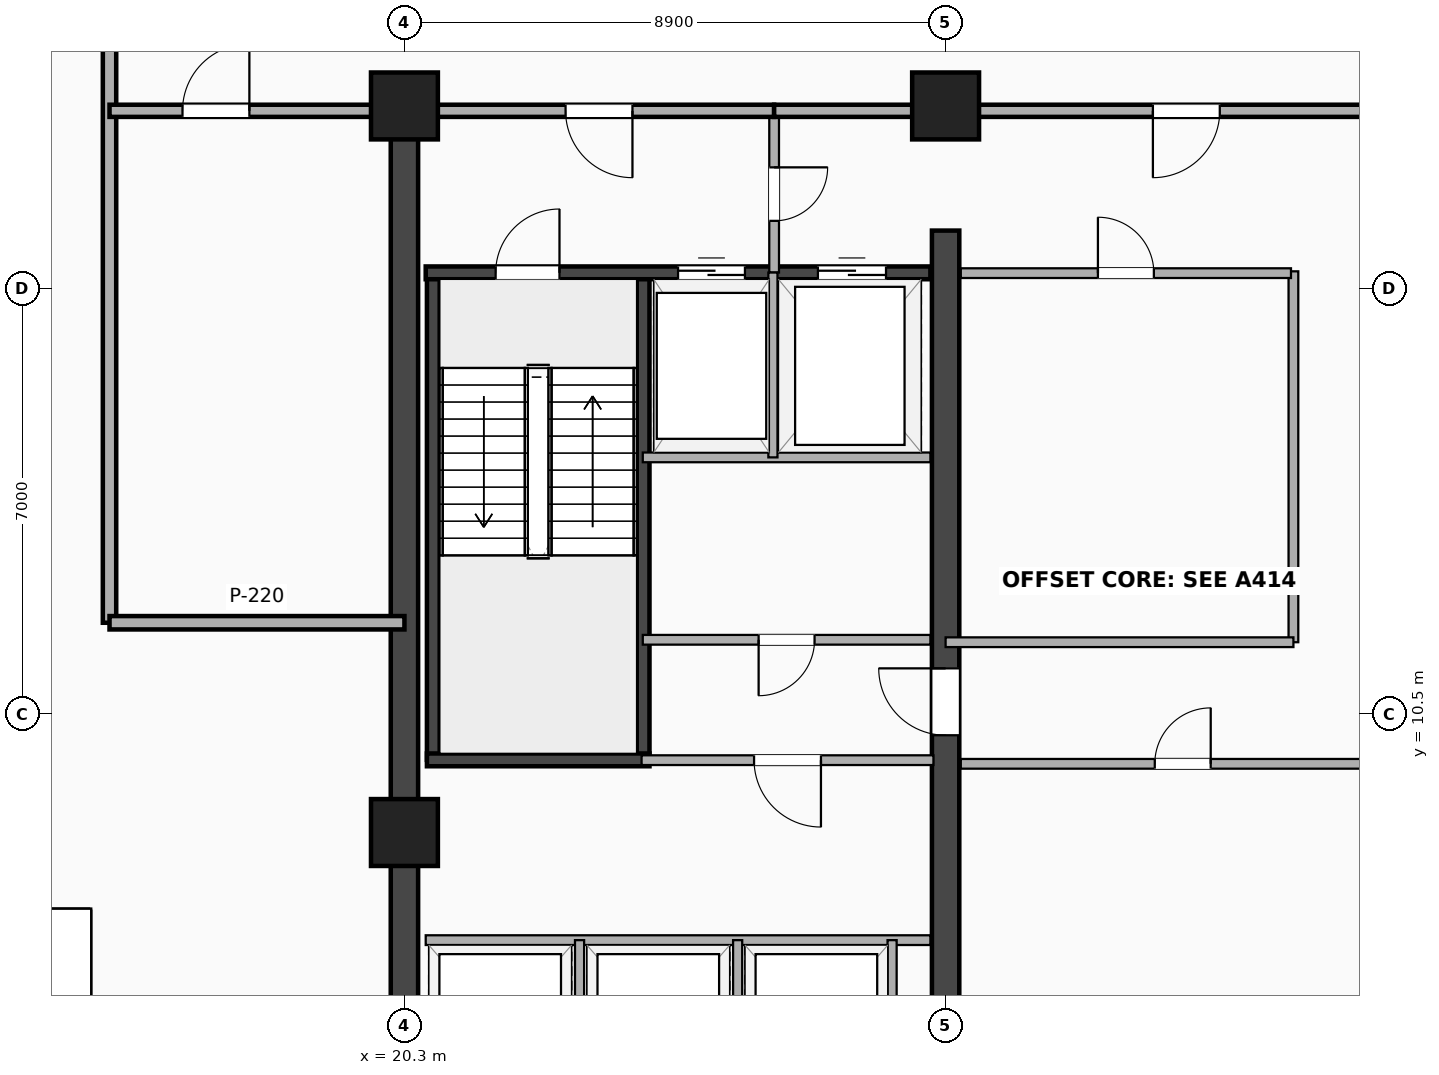
"""IFC4 building model, lengths in metres.
Left out: names, types, materials, properties, quantities, classifications, styles, units other than length and angle.
Written with IfcOpenShell. Run it as: python <this file> out.ifc"""

import sys

from ifc_helpers import new_model, si_unit, direction, frame, frame_2d, origin, origin_2d, place, context, subcontext, project, spatial, rectangle, extrude, element, fill, save


model = new_model("IFC4")
c1 = context("Model", 3, precision=1e-05, world=origin(), true_north=direction((0.0, 1.0)))
c2 = subcontext(c1, "Body", "Model", "MODEL_VIEW")
j1 = project(units=[si_unit("LENGTHUNIT", "METRE"), si_unit("PLANEANGLEUNIT", "RADIAN")], contexts=[c1])
p1 = place(None, origin())
s1 = spatial("IfcSite", under=j1, at=p1, CompositionType="ELEMENT")
p2 = place(p1, origin())
s2 = spatial("IfcBuilding", under=s1, at=p2, CompositionType="ELEMENT")
p3 = place(p2, frame((0.0, 0.0, 184.1)))
s3 = spatial("IfcBuildingStorey", under=s2, at=p3, CompositionType="ELEMENT", Elevation=184.1)
p4 = place(p3, frame((20.3, 3.5, 0.0), z_axis=(0.0, 0.0, 1.0), x_axis=(0.0, 1.0, 0.0)))
e1 = element("IfcWall", 1, at=p4, inside=s3, PredefinedType="SHEAR", context=c2, shape_type="SweptSolid", body=[
    extrude(rectangle(XDim=16.9, YDim=0.45, at=frame_2d((8.45, 0.0))), origin(), (0.0, 0.0, 1.0), 8.16),
])
p5 = place(p3, frame((29.2, 3.5, 0.0), z_axis=(0.0, 0.0, 1.0), x_axis=(0.0, 1.0, 0.0)))
e2 = element("IfcWall", 2, at=p5, inside=s3, PredefinedType="SHEAR", context=c2, shape_type="SweptSolid", body=[
    extrude(rectangle(XDim=14.95, YDim=0.45, at=frame_2d((7.475, 0.0))), origin(), (0.0, 0.0, 1.0), 8.16),
])
p6 = place(p5, frame((7.75, 0.0, 0.0), z_axis=(0.0, 0.0, 1.0), x_axis=(-1.0, 0.0, 0.0)))
e3 = element("IfcOpeningElement", 3, at=p6, cuts=e2, PredefinedType="OPENING", context=c2, shape_type="SweptSolid", body=[
    extrude(rectangle(XDim=1.1, YDim=2.15, at=frame_2d((0.55, 1.075))), frame((0.0, 0.235, 0.0), z_axis=(0.0, -1.0, 0.0), x_axis=(1.0, 0.0, 0.0)), (0.0, 0.0, 1.0), 0.47),
])
for number, where, z_axis, x_axis in (
    (4, (20.775, 9.745, 0.0), (0.0, 0.0, 1.0), (0.0, 1.0, 0.0)),
    (5, (24.225, 9.745, 0.0), (0.0, 0.0, 1.0), (0.0, 1.0, 0.0)),
):
    element("IfcWall", number, at=place(p3, frame(where, z_axis=z_axis, x_axis=x_axis)), inside=s3, PredefinedType="SHEAR", context=c2, shape_type="SweptSolid", body=[
        extrude(rectangle(XDim=8.01, YDim=0.21, at=frame_2d((4.005, 0.0))), origin(), (0.0, 0.0, 1.0), 8.16),
    ])
p7 = place(p3, frame((20.67, 9.745, 0.0), z_axis=(0.0, 0.0, 1.0), x_axis=(1.0, 0.0, 0.0)))
e6 = element("IfcWall", 6, at=p7, inside=s3, PredefinedType="SHEAR", context=c2, shape_type="SweptSolid", body=[
    extrude(rectangle(XDim=3.66, YDim=0.21, at=frame_2d((1.83, 0.0))), origin(), (0.0, 0.0, 1.0), 8.16),
])
p8 = place(p3, frame((20.65, 17.755, 0.0), z_axis=(0.0, 0.0, 1.0), x_axis=(1.0, 0.0, 0.0)))
e7 = element("IfcWall", 7, at=p8, inside=s3, PredefinedType="SHEAR", context=c2, shape_type="SweptSolid", body=[
    extrude(rectangle(XDim=8.3, YDim=0.21, at=frame_2d((4.15, 0.0))), origin(), (0.0, 0.0, 1.0), 8.16),
])
p9 = place(p8, frame((2.2, 0.0, 0.0), z_axis=(0.0, 0.0, 1.0), x_axis=(-1.0, 0.0, 0.0)))
e8 = element("IfcOpeningElement", 8, at=p9, cuts=e7, PredefinedType="OPENING", context=c2, shape_type="SweptSolid", body=[
    extrude(rectangle(XDim=1.05, YDim=2.15, at=frame_2d((0.525, 1.075))), frame((0.0, 0.115, 0.0), z_axis=(0.0, -1.0, 0.0), x_axis=(1.0, 0.0, 0.0)), (0.0, 0.0, 1.0), 0.23),
])
p10 = place(p8, frame((4.15, 0.0, 0.0)))
e9 = element("IfcOpeningElement", 9, at=p10, cuts=e7, PredefinedType="OPENING", context=c2, shape_type="SweptSolid", body=[
    extrude(rectangle(XDim=1.1, YDim=2.18, at=frame_2d((0.55, 1.09))), frame((0.0, 0.115, 0.0), z_axis=(0.0, -1.0, 0.0), x_axis=(1.0, 0.0, 0.0)), (0.0, 0.0, 1.0), 0.23),
])
p11 = place(p8, frame((6.45, 0.0, 0.0)))
e10 = element("IfcOpeningElement", 10, at=p11, cuts=e7, PredefinedType="OPENING", context=c2, shape_type="SweptSolid", body=[
    extrude(rectangle(XDim=1.12, YDim=2.2, at=frame_2d((0.56, 1.1))), frame((0.0, 0.115, 0.0), z_axis=(0.0, -1.0, 0.0), x_axis=(1.0, 0.0, 0.0)), (0.0, 0.0, 1.0), 0.23),
])
for number, where, z_axis, x_axis in (
    (11, (20.3, 8.55, -0.32), (0.0, 0.0, 1.0), (1.0, 0.0, 0.0)),
    (12, (20.3, 20.5, -0.32), (0.0, 0.0, 1.0), (1.0, 0.0, 0.0)),
    (13, (29.2, 20.5, -0.32), (0.0, 0.0, 1.0), (1.0, 0.0, 0.0)),
):
    element("IfcColumn", number, at=place(p3, frame(where, z_axis=z_axis, x_axis=x_axis)), inside=s3, PredefinedType="COLUMN", context=c2, shape_type="SweptSolid", body=[
        extrude(rectangle(XDim=1.1, YDim=1.1, at=origin_2d()), origin(), (0.0, 0.0, 1.0), 8.48),
    ])
p12 = place(p3, frame((26.38, 17.76, 0.0), z_axis=(0.0, 0.0, 1.0), x_axis=(0.0, 1.0, 0.0)))
e14 = element("IfcWall", 14, at=p12, inside=s3, PredefinedType="PARTITIONING", context=c2, shape_type="SweptSolid", body=[
    extrude(rectangle(XDim=2.66, YDim=0.16, at=frame_2d((1.33, 0.0))), origin(), (0.0, 0.0, 1.0), 7.602),
])
p13 = place(p12, frame((0.85, 0.0, 0.0)))
e15 = element("IfcOpeningElement", 15, at=p13, cuts=e14, PredefinedType="OPENING", context=c2, shape_type="SweptSolid", body=[
    extrude(rectangle(XDim=0.88, YDim=2.08, at=frame_2d((0.44, 1.04))), frame((0.0, 0.09, 0.0), z_axis=(0.0, -1.0, 0.0), x_axis=(1.0, 0.0, 0.0)), (0.0, 0.0, 1.0), 0.18),
])
p14 = place(p3, frame((24.22, 14.72, 0.0), z_axis=(0.0, 0.0, 1.0), x_axis=(1.0, 0.0, 0.0)))
e16 = element("IfcWall", 16, at=p14, inside=s3, PredefinedType="PARTITIONING", context=c2, shape_type="SweptSolid", body=[
    extrude(rectangle(XDim=4.73, YDim=0.16, at=frame_2d((2.365, 0.0))), origin(), (0.0, 0.0, 1.0), 8.16),
])
p15 = place(p3, frame((26.36, 14.72, 0.0), z_axis=(0.0, 0.0, 1.0), x_axis=(0.0, 1.0, 0.0)))
e17 = element("IfcWall", 17, at=p15, inside=s3, PredefinedType="PARTITIONING", context=c2, shape_type="SweptSolid", body=[
    extrude(rectangle(XDim=3.04, YDim=0.15, at=frame_2d((1.52, 0.0))), origin(), (0.0, 0.0, 1.0), 8.16),
])
p16 = place(p3, frame((20.65, 20.42, 0.0), z_axis=(0.0, 0.0, 1.0), x_axis=(1.0, 0.0, 0.0)))
e18 = element("IfcWall", 18, at=p16, inside=s3, PredefinedType="PARTITIONING", context=c2, shape_type="SweptSolid", body=[
    extrude(rectangle(XDim=5.73, YDim=0.2, at=frame_2d((2.865, 0.0))), origin(), (0.0, 0.0, 1.0), 7.29),
])
p17 = place(p16, frame((2.3, 0.0, 0.0)))
e19 = element("IfcOpeningElement", 19, at=p17, cuts=e18, PredefinedType="OPENING", context=c2, shape_type="SweptSolid", body=[
    extrude(rectangle(XDim=1.1, YDim=2.15, at=frame_2d((0.55, 1.075))), frame((0.0, 0.11, 0.0), z_axis=(0.0, -1.0, 0.0), x_axis=(1.0, 0.0, 0.0)), (0.0, 0.0, 1.0), 0.22),
])
p18 = place(p3, frame((26.38, 20.42, 0.0), z_axis=(0.0, 0.0, 1.0), x_axis=(1.0, 0.0, 0.0)))
e20 = element("IfcWall", 20, at=p18, inside=s3, PredefinedType="PARTITIONING", context=c2, shape_type="SweptSolid", body=[
    extrude(rectangle(XDim=2.82, YDim=0.2, at=frame_2d((1.41, 0.0))), origin(), (0.0, 0.0, 1.0), 7.29),
])
p19 = place(p3, frame((29.2, 20.42, 0.0), z_axis=(0.0, 0.0, 1.0), x_axis=(1.0, 0.0, 0.0)))
e21 = element("IfcWall", 21, at=p19, inside=s3, PredefinedType="PARTITIONING", context=c2, shape_type="SweptSolid", body=[
    extrude(rectangle(XDim=7.8, YDim=0.2, at=frame_2d((3.9, 0.0))), origin(), (0.0, 0.0, 1.0), 7.29),
])
p20 = place(p19, frame((3.409, 0.0, 0.0)))
e22 = element("IfcOpeningElement", 22, at=p20, cuts=e21, PredefinedType="OPENING", context=c2, shape_type="SweptSolid", body=[
    extrude(rectangle(XDim=1.1, YDim=2.15, at=frame_2d((0.55, 1.075))), frame((0.0, 0.11, 0.0), z_axis=(0.0, -1.0, 0.0), x_axis=(1.0, 0.0, 0.0)), (0.0, 0.0, 1.0), 0.22),
])
p21 = place(p3, frame((24.22, 11.72, 0.0), z_axis=(0.0, 0.0, 1.0), x_axis=(1.0, 0.0, 0.0)))
e23 = element("IfcWall", 23, at=p21, inside=s3, PredefinedType="PARTITIONING", context=c2, shape_type="SweptSolid", body=[
    extrude(rectangle(XDim=4.73, YDim=0.16, at=frame_2d((2.365, 0.0))), origin(), (0.0, 0.0, 1.0), 8.16),
])
p22 = place(p21, frame((1.905, 0.0, 0.0)))
e24 = element("IfcOpeningElement", 24, at=p22, cuts=e23, PredefinedType="OPENING", context=c2, shape_type="SweptSolid", body=[
    extrude(rectangle(XDim=0.92, YDim=2.08, at=frame_2d((0.46, 1.04))), frame((0.0, 0.09, 0.0), z_axis=(0.0, -1.0, 0.0), x_axis=(1.0, 0.0, 0.0)), (0.0, 0.0, 1.0), 0.18),
])
p23 = place(p3, frame((20.65, 6.78, 0.0), z_axis=(0.0, 0.0, 1.0), x_axis=(1.0, 0.0, 0.0)))
e25 = element("IfcWall", 25, at=p23, inside=s3, PredefinedType="PARTITIONING", context=c2, shape_type="SweptSolid", body=[
    extrude(rectangle(XDim=8.3, YDim=0.16, at=frame_2d((4.15, 0.0))), origin(), (0.0, 0.0, 1.0), 7.29),
])
for number, where, z_axis, x_axis in (
    (26, (23.18, 3.9, 0.0), (0.0, 0.0, 1.0), (0.0, 1.0, 0.0)),
    (27, (25.78, 3.9, 0.0), (0.0, 0.0, 1.0), (0.0, 1.0, 0.0)),
    (28, (28.32, 3.9, 0.0), (0.0, 0.0, 1.0), (0.0, 1.0, 0.0)),
):
    element("IfcWall", number, at=place(p3, frame(where, z_axis=z_axis, x_axis=x_axis)), inside=s3, PredefinedType="PARTITIONING", context=c2, shape_type="SweptSolid", body=[
        extrude(rectangle(XDim=2.88, YDim=0.15, at=frame_2d((1.44, 0.0))), origin(), (0.0, 0.0, 1.0), 8.16),
    ])
p24 = place(p3, frame((24.2, 9.74, 0.0), z_axis=(0.0, 0.0, 1.0), x_axis=(1.0, 0.0, 0.0)))
e29 = element("IfcWall", 29, at=p24, inside=s3, PredefinedType="PARTITIONING", context=c2, shape_type="SweptSolid", body=[
    extrude(rectangle(XDim=4.8, YDim=0.16, at=frame_2d((2.4, 0.0))), origin(), (0.0, 0.0, 1.0), 8.16),
])
p25 = place(p24, frame((1.85, 0.0, 0.0)))
e30 = element("IfcOpeningElement", 30, at=p25, cuts=e29, PredefinedType="OPENING", context=c2, shape_type="SweptSolid", body=[
    extrude(rectangle(XDim=1.1, YDim=2.15, at=frame_2d((0.55, 1.075))), frame((0.0, 0.09, 0.0), z_axis=(0.0, -1.0, 0.0), x_axis=(1.0, 0.0, 0.0)), (0.0, 0.0, 1.0), 0.18),
])
p26 = place(p3, frame((34.92, 11.68, 0.0), z_axis=(0.0, 0.0, 1.0), x_axis=(0.0, 1.0, 0.0)))
e31 = element("IfcWall", 31, at=p26, inside=s3, PredefinedType="PARTITIONING", context=c2, shape_type="SweptSolid", body=[
    extrude(rectangle(XDim=6.1, YDim=0.16, at=frame_2d((3.05, 0.0))), origin(), (0.0, 0.0, 1.0), 8.16),
])
p27 = place(p3, frame((29.45, 9.68, 0.0), z_axis=(0.0, 0.0, 1.0), x_axis=(1.0, 0.0, 0.0)))
e32 = element("IfcWall", 32, at=p27, inside=s3, PredefinedType="PARTITIONING", context=c2, shape_type="SweptSolid", body=[
    extrude(rectangle(XDim=7.3, YDim=0.16, at=frame_2d((3.65, 0.0))), origin(), (0.0, 0.0, 1.0), 8.16),
])
p28 = place(p27, frame((4.11, 0.0, 0.0), z_axis=(0.0, 0.0, 1.0), x_axis=(-1.0, 0.0, 0.0)))
e33 = element("IfcOpeningElement", 33, at=p28, cuts=e32, PredefinedType="OPENING", context=c2, shape_type="SweptSolid", body=[
    extrude(rectangle(XDim=0.92, YDim=2.08, at=frame_2d((0.46, 1.04))), frame((0.0, 0.09, 0.0), z_axis=(0.0, -1.0, 0.0), x_axis=(1.0, 0.0, 0.0)), (0.0, 0.0, 1.0), 0.18),
])
p29 = place(p3, frame((29.2, 11.68, 0.0), z_axis=(0.0, 0.0, 1.0), x_axis=(1.0, 0.0, 0.0)))
e34 = element("IfcWall", 34, at=p29, inside=s3, PredefinedType="PARTITIONING", context=c2, shape_type="SweptSolid", body=[
    extrude(rectangle(XDim=5.72, YDim=0.16, at=frame_2d((2.86, 0.0))), origin(), (0.0, 0.0, 1.0), 8.16),
])
p30 = place(p3, frame((29.45, 17.75, 0.0), z_axis=(0.0, 0.0, 1.0), x_axis=(1.0, 0.0, 0.0)))
e35 = element("IfcWall", 35, at=p30, inside=s3, PredefinedType="PARTITIONING", context=c2, shape_type="SweptSolid", body=[
    extrude(rectangle(XDim=5.43, YDim=0.16, at=frame_2d((2.715, 0.0))), origin(), (0.0, 0.0, 1.0), 8.16),
])
p31 = place(p30, frame((3.175, 0.0, 0.0), z_axis=(0.0, 0.0, 1.0), x_axis=(-1.0, 0.0, 0.0)))
e36 = element("IfcOpeningElement", 36, at=p31, cuts=e35, PredefinedType="OPENING", context=c2, shape_type="SweptSolid", body=[
    extrude(rectangle(XDim=0.92, YDim=2.08, at=frame_2d((0.46, 1.04))), frame((0.0, 0.09, 0.0), z_axis=(0.0, -1.0, 0.0), x_axis=(1.0, 0.0, 0.0)), (0.0, 0.0, 1.0), 0.18),
])
p32 = place(p3, frame((15.45, 12.0, 0.0), z_axis=(0.0, 0.0, 1.0), x_axis=(0.0, 1.0, 0.0)))
e37 = element("IfcWall", 37, at=p32, inside=s3, PredefinedType="PARTITIONING", context=c2, shape_type="SweptSolid", body=[
    extrude(rectangle(XDim=20.8, YDim=0.22, at=frame_2d((10.4, 0.0))), origin(), (0.0, 0.0, 1.0), 7.29),
])
p33 = place(p3, frame((15.45, 12.0, 0.0), z_axis=(0.0, 0.0, 1.0), x_axis=(1.0, 0.0, 0.0)))
e38 = element("IfcWall", 38, at=p33, inside=s3, PredefinedType="PARTITIONING", context=c2, shape_type="SweptSolid", body=[
    extrude(rectangle(XDim=4.85, YDim=0.22, at=frame_2d((2.425, 0.0))), origin(), (0.0, 0.0, 1.0), 7.29),
])
p34 = place(p3, frame((15.45, 20.42, 0.0), z_axis=(0.0, 0.0, 1.0), x_axis=(1.0, 0.0, 0.0)))
e39 = element("IfcWall", 39, at=p34, inside=s3, PredefinedType="PARTITIONING", context=c2, shape_type="SweptSolid", body=[
    extrude(rectangle(XDim=4.85, YDim=0.2, at=frame_2d((2.425, 0.0))), origin(), (0.0, 0.0, 1.0), 7.29),
])
p35 = place(p34, frame((2.3, 0.0, 0.0), z_axis=(0.0, 0.0, 1.0), x_axis=(-1.0, 0.0, 0.0)))
e40 = element("IfcOpeningElement", 40, at=p35, cuts=e39, PredefinedType="OPENING", context=c2, shape_type="SweptSolid", body=[
    extrude(rectangle(XDim=1.1, YDim=2.15, at=frame_2d((0.55, 1.075))), frame((0.0, 0.11, 0.0), z_axis=(0.0, -1.0, 0.0), x_axis=(1.0, 0.0, 0.0)), (0.0, 0.0, 1.0), 0.22),
])
p36 = place(p9, origin())
e41 = element("IfcDoor", 41, at=p36, inside=s3, OperationType="SINGLE_SWING_RIGHT", PredefinedType="DOOR", context=c2, shape_type="SweptSolid", body=[
    extrude(rectangle(XDim=1.05, YDim=2.15, at=frame_2d((0.525, 1.075))), frame((0.0, 0.025, 0.0), z_axis=(0.0, -1.0, 0.0), x_axis=(1.0, 0.0, 0.0)), (0.0, 0.0, 1.0), 0.05),
])
fill(e8, e41)
p37 = place(p10, origin())
e42 = element("IfcDoor", 42, at=p37, inside=s3, OperationType="DOUBLE_DOOR_SLIDING", PredefinedType="DOOR", context=c2, shape_type="SweptSolid", body=[
    extrude(rectangle(XDim=1.1, YDim=2.18, at=frame_2d((0.55, 1.09))), frame((0.0, 0.025, 0.0), z_axis=(0.0, -1.0, 0.0), x_axis=(1.0, 0.0, 0.0)), (0.0, 0.0, 1.0), 0.05),
])
fill(e9, e42)
p38 = place(p11, origin())
e43 = element("IfcDoor", 43, at=p38, inside=s3, OperationType="DOUBLE_DOOR_SLIDING", PredefinedType="DOOR", context=c2, shape_type="SweptSolid", body=[
    extrude(rectangle(XDim=1.12, YDim=2.2, at=frame_2d((0.56, 1.1))), frame((0.0, 0.025, 0.0), z_axis=(0.0, -1.0, 0.0), x_axis=(1.0, 0.0, 0.0)), (0.0, 0.0, 1.0), 0.05),
])
fill(e10, e43)
p39 = place(p6, origin())
e44 = element("IfcDoor", 44, at=p39, inside=s3, OperationType="SINGLE_SWING_RIGHT", PredefinedType="DOOR", context=c2, shape_type="SweptSolid", body=[
    extrude(rectangle(XDim=1.1, YDim=2.15, at=frame_2d((0.55, 1.075))), frame((0.0, 0.025, 0.0), z_axis=(0.0, -1.0, 0.0), x_axis=(1.0, 0.0, 0.0)), (0.0, 0.0, 1.0), 0.05),
])
fill(e3, e44)
p40 = place(p13, origin())
e45 = element("IfcDoor", 45, at=p40, inside=s3, OperationType="SINGLE_SWING_RIGHT", PredefinedType="DOOR", context=c2, shape_type="SweptSolid", body=[
    extrude(rectangle(XDim=0.88, YDim=2.08, at=frame_2d((0.44, 1.04))), frame((0.0, 0.025, 0.0), z_axis=(0.0, -1.0, 0.0), x_axis=(1.0, 0.0, 0.0)), (0.0, 0.0, 1.0), 0.05),
])
fill(e15, e45)
p41 = place(p17, origin())
e46 = element("IfcDoor", 46, at=p41, inside=s3, OperationType="SINGLE_SWING_RIGHT", PredefinedType="DOOR", context=c2, shape_type="SweptSolid", body=[
    extrude(rectangle(XDim=1.1, YDim=2.15, at=frame_2d((0.55, 1.075))), frame((0.0, 0.025, 0.0), z_axis=(0.0, -1.0, 0.0), x_axis=(1.0, 0.0, 0.0)), (0.0, 0.0, 1.0), 0.05),
])
fill(e19, e46)
p42 = place(p20, origin())
e47 = element("IfcDoor", 47, at=p42, inside=s3, OperationType="SINGLE_SWING_LEFT", PredefinedType="DOOR", context=c2, shape_type="SweptSolid", body=[
    extrude(rectangle(XDim=1.1, YDim=2.15, at=frame_2d((0.55, 1.075))), frame((0.0, 0.025, 0.0), z_axis=(0.0, -1.0, 0.0), x_axis=(1.0, 0.0, 0.0)), (0.0, 0.0, 1.0), 0.05),
])
fill(e22, e47)
p43 = place(p22, origin())
e48 = element("IfcDoor", 48, at=p43, inside=s3, OperationType="SINGLE_SWING_LEFT", PredefinedType="DOOR", context=c2, shape_type="SweptSolid", body=[
    extrude(rectangle(XDim=0.92, YDim=2.08, at=frame_2d((0.46, 1.04))), frame((0.0, 0.025, 0.0), z_axis=(0.0, -1.0, 0.0), x_axis=(1.0, 0.0, 0.0)), (0.0, 0.0, 1.0), 0.05),
])
fill(e24, e48)
p44 = place(p25, origin())
e49 = element("IfcDoor", 49, at=p44, inside=s3, OperationType="SINGLE_SWING_RIGHT", PredefinedType="DOOR", context=c2, shape_type="SweptSolid", body=[
    extrude(rectangle(XDim=1.1, YDim=2.15, at=frame_2d((0.55, 1.075))), frame((0.0, 0.025, 0.0), z_axis=(0.0, -1.0, 0.0), x_axis=(1.0, 0.0, 0.0)), (0.0, 0.0, 1.0), 0.05),
])
fill(e30, e49)
p45 = place(p28, origin())
e50 = element("IfcDoor", 50, at=p45, inside=s3, OperationType="SINGLE_SWING_RIGHT", PredefinedType="DOOR", context=c2, shape_type="SweptSolid", body=[
    extrude(rectangle(XDim=0.92, YDim=2.08, at=frame_2d((0.46, 1.04))), frame((0.0, 0.025, 0.0), z_axis=(0.0, -1.0, 0.0), x_axis=(1.0, 0.0, 0.0)), (0.0, 0.0, 1.0), 0.05),
])
fill(e33, e50)
p46 = place(p31, origin())
e51 = element("IfcDoor", 51, at=p46, inside=s3, OperationType="SINGLE_SWING_LEFT", PredefinedType="DOOR", context=c2, shape_type="SweptSolid", body=[
    extrude(rectangle(XDim=0.92, YDim=2.08, at=frame_2d((0.46, 1.04))), frame((0.0, 0.025, 0.0), z_axis=(0.0, -1.0, 0.0), x_axis=(1.0, 0.0, 0.0)), (0.0, 0.0, 1.0), 0.05),
])
fill(e36, e51)
p47 = place(p35, origin())
e52 = element("IfcDoor", 52, at=p47, inside=s3, OperationType="SINGLE_SWING_RIGHT", PredefinedType="DOOR", context=c2, shape_type="SweptSolid", body=[
    extrude(rectangle(XDim=1.1, YDim=2.15, at=frame_2d((0.55, 1.075))), frame((0.0, 0.025, 0.0), z_axis=(0.0, -1.0, 0.0), x_axis=(1.0, 0.0, 0.0)), (0.0, 0.0, 1.0), 0.05),
])
fill(e40, e52)
save(model, sys.argv[1])
